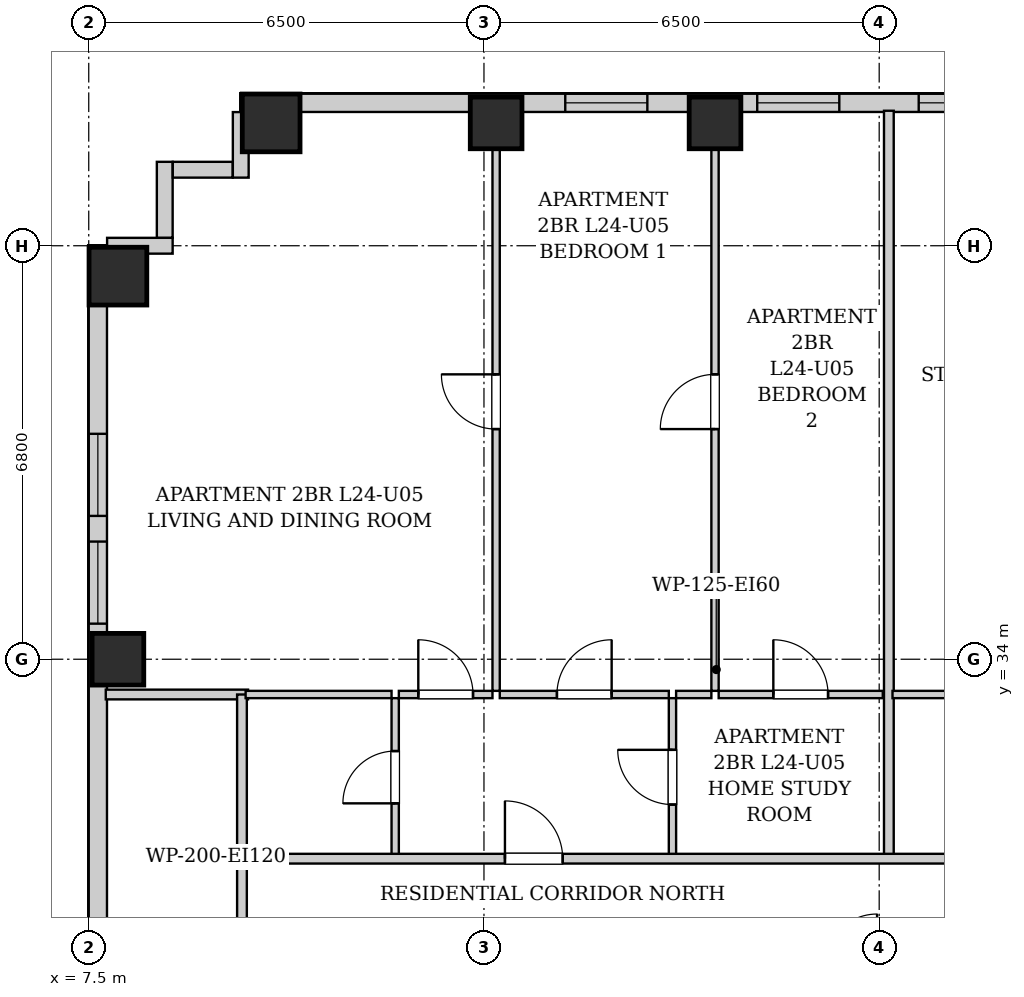
"""IFC4 building model, lengths in metres.
Left out: names, types, materials, properties, quantities, classifications, styles, units other than length and angle.
Written with IfcOpenShell. Run it as: python <this file> out.ifc"""

import sys

from ifc_helpers import new_model, si_unit, direction, frame, frame_2d, origin, origin_2d, place, context, subcontext, project, spatial, rectangle, extrude, element, fill, save


model = new_model("IFC4")
c1 = context("Model", 3, precision=1e-05, world=origin(), true_north=direction((0.0, 1.0)))
c2 = subcontext(c1, "Body", "Model", "MODEL_VIEW")
j1 = project(units=[si_unit("LENGTHUNIT", "METRE"), si_unit("PLANEANGLEUNIT", "RADIAN")], contexts=[c1])
p1 = place(None, origin())
s1 = spatial("IfcSite", under=j1, at=p1, CompositionType="ELEMENT")
p2 = place(p1, origin())
s2 = spatial("IfcBuilding", under=s1, at=p2, CompositionType="ELEMENT")
p3 = place(p2, frame((0.0, 0.0, 87.9)))
s3 = spatial("IfcBuildingStorey", under=s2, at=p3, CompositionType="ELEMENT", Elevation=87.9)
p4 = place(p3, frame((10.5, 42.82, 0.0), z_axis=(0.0, 0.0, 1.0), x_axis=(1.0, 0.0, 0.0)))
e1 = element("IfcColumn", 1, at=p4, inside=s3, PredefinedType="COLUMN", context=c2, shape_type="SweptSolid", body=[
    extrude(rectangle(XDim=0.95, YDim=0.95, at=origin_2d()), origin(), (0.0, 0.0, 1.0), 3.2),
])
for number, where, z_axis, x_axis in (
    (2, (14.2, 42.82, 0.0), (0.0, 0.0, 1.0), (1.0, 0.0, 0.0)),
    (3, (17.8, 42.82, 0.0), (0.0, 0.0, 1.0), (1.0, 0.0, 0.0)),
    (4, (7.98, 34.0, 0.0), (0.0, 0.0, 1.0), (1.0, 0.0, 0.0)),
):
    element("IfcColumn", number, at=place(p3, frame(where, z_axis=z_axis, x_axis=x_axis)), inside=s3, PredefinedType="COLUMN", context=c2, shape_type="SweptSolid", body=[
        extrude(rectangle(XDim=0.85, YDim=0.85, at=origin_2d()), origin(), (0.0, 0.0, 1.0), 3.2),
    ])
p5 = place(p3, frame((7.98, 40.3, 0.0), z_axis=(0.0, 0.0, 1.0), x_axis=(1.0, 0.0, 0.0)))
e5 = element("IfcColumn", 5, at=p5, inside=s3, PredefinedType="COLUMN", context=c2, shape_type="SweptSolid", body=[
    extrude(rectangle(XDim=0.95, YDim=0.95, at=origin_2d()), origin(), (0.0, 0.0, 1.0), 3.2),
])
p6 = place(p3, frame((10.0, 43.15, 0.0), z_axis=(0.0, 0.0, 1.0), x_axis=(1.0, 0.0, 0.0)))
e6 = element("IfcWall", 6, at=p6, inside=s3, PredefinedType="SOLIDWALL", context=c2, shape_type="SweptSolid", body=[
    extrude(rectangle(XDim=23.9, YDim=0.3, at=frame_2d((11.95, 0.0))), origin(), (0.0, 0.0, 1.0), 2.94),
])
p7 = place(p6, frame((5.337, 0.0, 0.55)))
e7 = element("IfcOpeningElement", 7, at=p7, cuts=e6, PredefinedType="OPENING", context=c2, shape_type="SweptSolid", body=[
    extrude(rectangle(XDim=1.35, YDim=1.2, at=frame_2d((0.675, 0.6))), frame((0.0, 0.16, 0.0), z_axis=(0.0, -1.0, 0.0), x_axis=(1.0, 0.0, 0.0)), (0.0, 0.0, 1.0), 0.32),
])
p8 = place(p6, frame((8.494, 0.0, 0.55)))
e8 = element("IfcOpeningElement", 8, at=p8, cuts=e6, PredefinedType="OPENING", context=c2, shape_type="SweptSolid", body=[
    extrude(rectangle(XDim=1.35, YDim=1.2, at=frame_2d((0.675, 0.6))), frame((0.0, 0.16, 0.0), z_axis=(0.0, -1.0, 0.0), x_axis=(1.0, 0.0, 0.0)), (0.0, 0.0, 1.0), 0.32),
])
p9 = place(p6, frame((11.15, 0.0, 0.55)))
e9 = element("IfcOpeningElement", 9, at=p9, cuts=e6, PredefinedType="OPENING", context=c2, shape_type="SweptSolid", body=[
    extrude(rectangle(XDim=1.35, YDim=1.2, at=frame_2d((0.675, 0.6))), frame((0.0, 0.16, 0.0), z_axis=(0.0, -1.0, 0.0), x_axis=(1.0, 0.0, 0.0)), (0.0, 0.0, 1.0), 0.32),
])
p10 = place(p6, frame((17.738, 0.0, 0.55)))
e10 = element("IfcOpeningElement", 10, at=p10, cuts=e6, PredefinedType="OPENING", context=c2, shape_type="SweptSolid", body=[
    extrude(rectangle(XDim=1.35, YDim=1.2, at=frame_2d((0.675, 0.6))), frame((0.0, 0.16, 0.0), z_axis=(0.0, -1.0, 0.0), x_axis=(1.0, 0.0, 0.0)), (0.0, 0.0, 1.0), 0.32),
])
p11 = place(p6, frame((20.97, 0.0, 0.55)))
e11 = element("IfcOpeningElement", 11, at=p11, cuts=e6, PredefinedType="OPENING", context=c2, shape_type="SweptSolid", body=[
    extrude(rectangle(XDim=1.35, YDim=1.2, at=frame_2d((0.675, 0.6))), frame((0.0, 0.16, 0.0), z_axis=(0.0, -1.0, 0.0), x_axis=(1.0, 0.0, 0.0)), (0.0, 0.0, 1.0), 0.32),
])
p12 = place(p3, frame((7.65, 19.4, 0.0), z_axis=(0.0, 0.0, 1.0), x_axis=(0.0, 1.0, 0.0)))
e12 = element("IfcWall", 12, at=p12, inside=s3, PredefinedType="SOLIDWALL", context=c2, shape_type="SweptSolid", body=[
    extrude(rectangle(XDim=21.4, YDim=0.3, at=frame_2d((10.7, 0.0))), origin(), (0.0, 0.0, 1.0), 2.94),
])
p13 = place(p12, frame((16.957, 0.0, 0.55)))
e13 = element("IfcOpeningElement", 13, at=p13, cuts=e12, PredefinedType="OPENING", context=c2, shape_type="SweptSolid", body=[
    extrude(rectangle(XDim=1.35, YDim=1.2, at=frame_2d((0.675, 0.6))), frame((0.0, 0.16, 0.0), z_axis=(0.0, -1.0, 0.0), x_axis=(1.0, 0.0, 0.0)), (0.0, 0.0, 1.0), 0.32),
])
p14 = place(p12, frame((15.185, 0.0, 0.55)))
e14 = element("IfcOpeningElement", 14, at=p14, cuts=e12, PredefinedType="OPENING", context=c2, shape_type="SweptSolid", body=[
    extrude(rectangle(XDim=1.35, YDim=1.2, at=frame_2d((0.675, 0.6))), frame((0.0, 0.16, 0.0), z_axis=(0.0, -1.0, 0.0), x_axis=(1.0, 0.0, 0.0)), (0.0, 0.0, 1.0), 0.32),
])
p15 = place(p12, frame((5.1, 0.0, 0.55)))
e15 = element("IfcOpeningElement", 15, at=p15, cuts=e12, PredefinedType="OPENING", context=c2, shape_type="SweptSolid", body=[
    extrude(rectangle(XDim=1.35, YDim=1.2, at=frame_2d((0.675, 0.6))), frame((0.0, 0.16, 0.0), z_axis=(0.0, -1.0, 0.0), x_axis=(1.0, 0.0, 0.0)), (0.0, 0.0, 1.0), 0.32),
])
p16 = place(p12, frame((6.71, 0.0, 0.55)))
e16 = element("IfcOpeningElement", 16, at=p16, cuts=e12, PredefinedType="OPENING", context=c2, shape_type="SweptSolid", body=[
    extrude(rectangle(XDim=1.35, YDim=1.2, at=frame_2d((0.675, 0.6))), frame((0.0, 0.16, 0.0), z_axis=(0.0, -1.0, 0.0), x_axis=(1.0, 0.0, 0.0)), (0.0, 0.0, 1.0), 0.32),
])
p17 = place(p3, frame((7.802, 40.8, 0.0), z_axis=(0.0, 0.0, 1.0), x_axis=(1.0, 0.0, 0.0)))
e17 = element("IfcWall", 17, at=p17, inside=s3, PredefinedType="SOLIDWALL", context=c2, shape_type="SweptSolid", body=[
    extrude(rectangle(XDim=1.078, YDim=0.26, at=frame_2d((0.539, 0.0))), origin(), (0.0, 0.0, 1.0), 2.94),
])
p18 = place(p3, frame((8.75, 40.932, 0.0), z_axis=(0.0, 0.0, 1.0), x_axis=(0.0, 1.0, 0.0)))
e18 = element("IfcWall", 18, at=p18, inside=s3, PredefinedType="SOLIDWALL", context=c2, shape_type="SweptSolid", body=[
    extrude(rectangle(XDim=1.248, YDim=0.26, at=frame_2d((0.624, 0.0))), origin(), (0.0, 0.0, 1.0), 2.94),
])
p19 = place(p3, frame((8.882, 42.05, 0.0), z_axis=(0.0, 0.0, 1.0), x_axis=(1.0, 0.0, 0.0)))
e19 = element("IfcWall", 19, at=p19, inside=s3, PredefinedType="SOLIDWALL", context=c2, shape_type="SweptSolid", body=[
    extrude(rectangle(XDim=0.986, YDim=0.26, at=frame_2d((0.493, 0.0))), origin(), (0.0, 0.0, 1.0), 2.94),
])
p20 = place(p3, frame((10.0, 41.92, 0.0), z_axis=(0.0, 0.0, 1.0), x_axis=(0.0, 1.0, 0.0)))
e20 = element("IfcWall", 20, at=p20, inside=s3, PredefinedType="SOLIDWALL", context=c2, shape_type="SweptSolid", body=[
    extrude(rectangle(XDim=1.078, YDim=0.26, at=frame_2d((0.539, 0.0))), origin(), (0.0, 0.0, 1.0), 2.94),
])
p21 = place(p3, frame((10.02, 28.98, 0.0), z_axis=(0.0, 0.0, 1.0), x_axis=(0.0, 1.0, 0.0)))
e21 = element("IfcWall", 21, at=p21, inside=s3, PredefinedType="PARTITIONING", context=c2, shape_type="SweptSolid", body=[
    extrude(rectangle(XDim=1.74, YDim=0.16, at=frame_2d((0.87, 0.0))), origin(), (0.0, 0.0, 1.0), 2.94),
])
p22 = place(p3, frame((7.78, 33.42, 0.0), z_axis=(0.0, 0.0, 1.0), x_axis=(1.0, 0.0, 0.0)))
e22 = element("IfcWall", 22, at=p22, inside=s3, PredefinedType="PARTITIONING", context=c2, shape_type="SweptSolid", body=[
    extrude(rectangle(XDim=2.34, YDim=0.16, at=frame_2d((1.17, 0.0))), origin(), (0.0, 0.0, 1.0), 2.94),
])
p23 = place(p3, frame((10.02, 30.76, 0.0), z_axis=(0.0, 0.0, 1.0), x_axis=(0.0, 1.0, 0.0)))
e23 = element("IfcWall", 23, at=p23, inside=s3, PredefinedType="PARTITIONING", context=c2, shape_type="SweptSolid", body=[
    extrude(rectangle(XDim=2.66, YDim=0.16, at=frame_2d((1.33, 0.0))), origin(), (0.0, 0.0, 1.0), 2.94),
])
p24 = place(p3, frame((12.54, 30.76, 0.0), z_axis=(0.0, 0.0, 1.0), x_axis=(0.0, 1.0, 0.0)))
e24 = element("IfcWall", 24, at=p24, inside=s3, PredefinedType="PARTITIONING", context=c2, shape_type="SweptSolid", body=[
    extrude(rectangle(XDim=2.6, YDim=0.12, at=frame_2d((1.3, 0.0))), origin(), (0.0, 0.0, 1.0), 2.94),
])
p25 = place(p24, frame((0.87, 0.0, 0.0)))
e25 = element("IfcOpeningElement", 25, at=p25, cuts=e24, PredefinedType="OPENING", context=c2, shape_type="SweptSolid", body=[
    extrude(rectangle(XDim=0.86, YDim=2.05, at=frame_2d((0.43, 1.025))), frame((0.0, 0.07, 0.0), z_axis=(0.0, -1.0, 0.0), x_axis=(1.0, 0.0, 0.0)), (0.0, 0.0, 1.0), 0.14),
])
p26 = place(p3, frame((10.08, 33.42, 0.0), z_axis=(0.0, 0.0, 1.0), x_axis=(1.0, 0.0, 0.0)))
e26 = element("IfcWall", 26, at=p26, inside=s3, PredefinedType="PARTITIONING", context=c2, shape_type="SweptSolid", body=[
    extrude(rectangle(XDim=2.4, YDim=0.12, at=frame_2d((1.2, 0.0))), origin(), (0.0, 0.0, 1.0), 2.94),
])
p27 = place(p3, frame((17.1, 30.76, 0.0), z_axis=(0.0, 0.0, 1.0), x_axis=(0.0, 1.0, 0.0)))
e27 = element("IfcWall", 27, at=p27, inside=s3, PredefinedType="PARTITIONING", context=c2, shape_type="SweptSolid", body=[
    extrude(rectangle(XDim=2.6, YDim=0.12, at=frame_2d((1.3, 0.0))), origin(), (0.0, 0.0, 1.0), 2.94),
])
p28 = place(p27, frame((0.85, 0.0, 0.0)))
e28 = element("IfcOpeningElement", 28, at=p28, cuts=e27, PredefinedType="OPENING", context=c2, shape_type="SweptSolid", body=[
    extrude(rectangle(XDim=0.9, YDim=2.05, at=frame_2d((0.45, 1.025))), frame((0.0, 0.07, 0.0), z_axis=(0.0, -1.0, 0.0), x_axis=(1.0, 0.0, 0.0)), (0.0, 0.0, 1.0), 0.14),
])
p29 = place(p3, frame((12.6, 33.42, 0.0), z_axis=(0.0, 0.0, 1.0), x_axis=(1.0, 0.0, 0.0)))
e29 = element("IfcWall", 29, at=p29, inside=s3, PredefinedType="PARTITIONING", context=c2, shape_type="SweptSolid", body=[
    extrude(rectangle(XDim=1.54, YDim=0.12, at=frame_2d((0.77, 0.0))), origin(), (0.0, 0.0, 1.0), 2.94),
])
p30 = place(p29, frame((0.32, 0.0, 0.0)))
e30 = element("IfcOpeningElement", 30, at=p30, cuts=e29, PredefinedType="OPENING", context=c2, shape_type="SweptSolid", body=[
    extrude(rectangle(XDim=0.9, YDim=2.05, at=frame_2d((0.45, 1.025))), frame((0.0, 0.07, 0.0), z_axis=(0.0, -1.0, 0.0), x_axis=(1.0, 0.0, 0.0)), (0.0, 0.0, 1.0), 0.14),
])
p31 = place(p3, frame((14.26, 33.42, 0.0), z_axis=(0.0, 0.0, 1.0), x_axis=(1.0, 0.0, 0.0)))
e31 = element("IfcWall", 31, at=p31, inside=s3, PredefinedType="PARTITIONING", context=c2, shape_type="SweptSolid", body=[
    extrude(rectangle(XDim=2.78, YDim=0.12, at=frame_2d((1.39, 0.0))), origin(), (0.0, 0.0, 1.0), 2.94),
])
p32 = place(p31, frame((0.94, 0.0, 0.0)))
e32 = element("IfcOpeningElement", 32, at=p32, cuts=e31, PredefinedType="OPENING", context=c2, shape_type="SweptSolid", body=[
    extrude(rectangle(XDim=0.9, YDim=2.05, at=frame_2d((0.45, 1.025))), frame((0.0, 0.07, 0.0), z_axis=(0.0, -1.0, 0.0), x_axis=(1.0, 0.0, 0.0)), (0.0, 0.0, 1.0), 0.14),
])
p33 = place(p3, frame((17.16, 33.42, 0.0), z_axis=(0.0, 0.0, 1.0), x_axis=(1.0, 0.0, 0.0)))
e33 = element("IfcWall", 33, at=p33, inside=s3, PredefinedType="PARTITIONING", context=c2, shape_type="SweptSolid", body=[
    extrude(rectangle(XDim=0.58, YDim=0.12, at=frame_2d((0.29, 0.0))), origin(), (0.0, 0.0, 1.0), 2.94),
])
p34 = place(p3, frame((17.86, 33.42, 0.0), z_axis=(0.0, 0.0, 1.0), x_axis=(1.0, 0.0, 0.0)))
e34 = element("IfcWall", 34, at=p34, inside=s3, PredefinedType="PARTITIONING", context=c2, shape_type="SweptSolid", body=[
    extrude(rectangle(XDim=2.699, YDim=0.12, at=frame_2d((1.35, 0.0))), origin(), (0.0, 0.0, 1.0), 2.94),
])
p35 = place(p34, frame((0.899, 0.0, 0.0)))
e35 = element("IfcOpeningElement", 35, at=p35, cuts=e34, PredefinedType="OPENING", context=c2, shape_type="SweptSolid", body=[
    extrude(rectangle(XDim=0.9, YDim=2.05, at=frame_2d((0.45, 1.025))), frame((0.0, 0.07, 0.0), z_axis=(0.0, -1.0, 0.0), x_axis=(1.0, 0.0, 0.0)), (0.0, 0.0, 1.0), 0.14),
])
p36 = place(p3, frame((14.2, 33.48, 0.0), z_axis=(0.0, 0.0, 1.0), x_axis=(0.0, 1.0, 0.0)))
e36 = element("IfcWall", 36, at=p36, inside=s3, PredefinedType="PARTITIONING", context=c2, shape_type="SweptSolid", body=[
    extrude(rectangle(XDim=9.54, YDim=0.12, at=frame_2d((4.77, 0.0))), origin(), (0.0, 0.0, 1.0), 2.94),
])
p37 = place(p36, frame((4.305, 0.0, 0.0)))
e37 = element("IfcOpeningElement", 37, at=p37, cuts=e36, PredefinedType="OPENING", context=c2, shape_type="SweptSolid", body=[
    extrude(rectangle(XDim=0.9, YDim=2.05, at=frame_2d((0.45, 1.025))), frame((0.0, 0.07, 0.0), z_axis=(0.0, -1.0, 0.0), x_axis=(1.0, 0.0, 0.0)), (0.0, 0.0, 1.0), 0.14),
])
p38 = place(p3, frame((17.8, 33.48, 0.0), z_axis=(0.0, 0.0, 1.0), x_axis=(0.0, 1.0, 0.0)))
e38 = element("IfcWall", 38, at=p38, inside=s3, PredefinedType="PARTITIONING", context=c2, shape_type="SweptSolid", body=[
    extrude(rectangle(XDim=9.54, YDim=0.12, at=frame_2d((4.77, 0.0))), origin(), (0.0, 0.0, 1.0), 2.309),
])
p39 = place(p38, frame((4.305, 0.0, 0.0)))
e39 = element("IfcOpeningElement", 39, at=p39, cuts=e38, PredefinedType="OPENING", context=c2, shape_type="SweptSolid", body=[
    extrude(rectangle(XDim=0.9, YDim=2.05, at=frame_2d((0.45, 1.025))), frame((0.0, 0.07, 0.0), z_axis=(0.0, -1.0, 0.0), x_axis=(1.0, 0.0, 0.0)), (0.0, 0.0, 1.0), 0.14),
])
p40 = place(p3, frame((20.659, 30.76, 0.0), z_axis=(0.0, 0.0, 1.0), x_axis=(0.0, 1.0, 0.0)))
e40 = element("IfcWall", 40, at=p40, inside=s3, PredefinedType="PARTITIONING", context=c2, shape_type="SweptSolid", body=[
    extrude(rectangle(XDim=12.26, YDim=0.16, at=frame_2d((6.13, 0.0))), origin(), (0.0, 0.0, 1.0), 2.94),
])
p41 = place(p3, frame((20.719, 33.42, 0.0), z_axis=(0.0, 0.0, 1.0), x_axis=(1.0, 0.0, 0.0)))
e41 = element("IfcWall", 41, at=p41, inside=s3, PredefinedType="PARTITIONING", context=c2, shape_type="SweptSolid", body=[
    extrude(rectangle(XDim=1.85, YDim=0.12, at=frame_2d((0.925, 0.0))), origin(), (0.0, 0.0, 1.0), 2.94),
])
p42 = place(p3, frame((10.05, 30.72, 0.0), z_axis=(0.0, 0.0, 1.0), x_axis=(1.0, 0.0, 0.0)))
e42 = element("IfcWall", 42, at=p42, inside=s3, PredefinedType="PARTITIONING", context=c2, shape_type="SweptSolid", body=[
    extrude(rectangle(XDim=30.8, YDim=0.16, at=frame_2d((15.4, 0.0))), origin(), (0.0, 0.0, 1.0), 2.94),
])
p43 = place(p42, frame((4.295, 0.0, 0.0)))
e43 = element("IfcOpeningElement", 43, at=p43, cuts=e42, PredefinedType="OPENING", context=c2, shape_type="SweptSolid", body=[
    extrude(rectangle(XDim=0.95, YDim=2.1, at=frame_2d((0.475, 1.05))), frame((0.0, 0.09, 0.0), z_axis=(0.0, -1.0, 0.0), x_axis=(1.0, 0.0, 0.0)), (0.0, 0.0, 1.0), 0.18),
])
p44 = place(p42, frame((14.179, 0.0, 0.0)))
e44 = element("IfcOpeningElement", 44, at=p44, cuts=e42, PredefinedType="OPENING", context=c2, shape_type="SweptSolid", body=[
    extrude(rectangle(XDim=0.95, YDim=2.1, at=frame_2d((0.475, 1.05))), frame((0.0, 0.09, 0.0), z_axis=(0.0, -1.0, 0.0), x_axis=(1.0, 0.0, 0.0)), (0.0, 0.0, 1.0), 0.18),
])
p45 = place(p42, frame((20.965, 0.0, 0.0)))
e45 = element("IfcOpeningElement", 45, at=p45, cuts=e42, PredefinedType="OPENING", context=c2, shape_type="SweptSolid", body=[
    extrude(rectangle(XDim=0.95, YDim=2.1, at=frame_2d((0.475, 1.05))), frame((0.0, 0.09, 0.0), z_axis=(0.0, -1.0, 0.0), x_axis=(1.0, 0.0, 0.0)), (0.0, 0.0, 1.0), 0.18),
])
p46 = place(p25, origin())
e46 = element("IfcDoor", 46, at=p46, inside=s3, OperationType="SINGLE_SWING_LEFT", PredefinedType="DOOR", context=c2, shape_type="SweptSolid", body=[
    extrude(rectangle(XDim=0.86, YDim=2.05, at=frame_2d((0.43, 1.025))), frame((0.0, 0.025, 0.0), z_axis=(0.0, -1.0, 0.0), x_axis=(1.0, 0.0, 0.0)), (0.0, 0.0, 1.0), 0.05),
])
fill(e25, e46)
p47 = place(p28, origin())
e47 = element("IfcDoor", 47, at=p47, inside=s3, OperationType="SINGLE_SWING_RIGHT", PredefinedType="DOOR", context=c2, shape_type="SweptSolid", body=[
    extrude(rectangle(XDim=0.9, YDim=2.05, at=frame_2d((0.45, 1.025))), frame((0.0, 0.025, 0.0), z_axis=(0.0, -1.0, 0.0), x_axis=(1.0, 0.0, 0.0)), (0.0, 0.0, 1.0), 0.05),
])
fill(e28, e47)
p48 = place(p30, origin())
e48 = element("IfcDoor", 48, at=p48, inside=s3, OperationType="SINGLE_SWING_LEFT", PredefinedType="DOOR", context=c2, shape_type="SweptSolid", body=[
    extrude(rectangle(XDim=0.9, YDim=2.05, at=frame_2d((0.45, 1.025))), frame((0.0, 0.025, 0.0), z_axis=(0.0, -1.0, 0.0), x_axis=(1.0, 0.0, 0.0)), (0.0, 0.0, 1.0), 0.05),
])
fill(e30, e48)
p49 = place(p32, origin())
e49 = element("IfcDoor", 49, at=p49, inside=s3, OperationType="SINGLE_SWING_RIGHT", PredefinedType="DOOR", context=c2, shape_type="SweptSolid", body=[
    extrude(rectangle(XDim=0.9, YDim=2.05, at=frame_2d((0.45, 1.025))), frame((0.0, 0.025, 0.0), z_axis=(0.0, -1.0, 0.0), x_axis=(1.0, 0.0, 0.0)), (0.0, 0.0, 1.0), 0.05),
])
fill(e32, e49)
p50 = place(p35, origin())
e50 = element("IfcDoor", 50, at=p50, inside=s3, OperationType="SINGLE_SWING_LEFT", PredefinedType="DOOR", context=c2, shape_type="SweptSolid", body=[
    extrude(rectangle(XDim=0.9, YDim=2.05, at=frame_2d((0.45, 1.025))), frame((0.0, 0.025, 0.0), z_axis=(0.0, -1.0, 0.0), x_axis=(1.0, 0.0, 0.0)), (0.0, 0.0, 1.0), 0.05),
])
fill(e35, e50)
p51 = place(p37, origin())
e51 = element("IfcDoor", 51, at=p51, inside=s3, OperationType="SINGLE_SWING_RIGHT", PredefinedType="DOOR", context=c2, shape_type="SweptSolid", body=[
    extrude(rectangle(XDim=0.9, YDim=2.05, at=frame_2d((0.45, 1.025))), frame((0.0, 0.025, 0.0), z_axis=(0.0, -1.0, 0.0), x_axis=(1.0, 0.0, 0.0)), (0.0, 0.0, 1.0), 0.05),
])
fill(e37, e51)
p52 = place(p39, origin())
e52 = element("IfcDoor", 52, at=p52, inside=s3, OperationType="SINGLE_SWING_LEFT", PredefinedType="DOOR", context=c2, shape_type="SweptSolid", body=[
    extrude(rectangle(XDim=0.9, YDim=2.05, at=frame_2d((0.45, 1.025))), frame((0.0, 0.025, 0.0), z_axis=(0.0, -1.0, 0.0), x_axis=(1.0, 0.0, 0.0)), (0.0, 0.0, 1.0), 0.05),
])
fill(e39, e52)
p53 = place(p43, origin())
e53 = element("IfcDoor", 53, at=p53, inside=s3, OperationType="SINGLE_SWING_LEFT", PredefinedType="DOOR", context=c2, shape_type="SweptSolid", body=[
    extrude(rectangle(XDim=0.95, YDim=2.1, at=frame_2d((0.475, 1.05))), frame((0.0, 0.025, 0.0), z_axis=(0.0, -1.0, 0.0), x_axis=(1.0, 0.0, 0.0)), (0.0, 0.0, 1.0), 0.05),
])
fill(e43, e53)
p54 = place(p13, origin())
e54 = element("IfcWindow", 54, at=p54, inside=s3, PartitioningType="SINGLE_PANEL", PredefinedType="WINDOW", context=c2, shape_type="SweptSolid", body=[
    extrude(rectangle(XDim=1.35, YDim=1.2, at=frame_2d((0.675, 0.6))), frame((0.0, 0.03, 0.0), z_axis=(0.0, -1.0, 0.0), x_axis=(1.0, 0.0, 0.0)), (0.0, 0.0, 1.0), 0.06),
])
fill(e13, e54)
p55 = place(p14, origin())
e55 = element("IfcWindow", 55, at=p55, inside=s3, PartitioningType="SINGLE_PANEL", PredefinedType="WINDOW", context=c2, shape_type="SweptSolid", body=[
    extrude(rectangle(XDim=1.35, YDim=1.2, at=frame_2d((0.675, 0.6))), frame((0.0, 0.03, 0.0), z_axis=(0.0, -1.0, 0.0), x_axis=(1.0, 0.0, 0.0)), (0.0, 0.0, 1.0), 0.06),
])
fill(e14, e55)
p56 = place(p7, origin())
e56 = element("IfcWindow", 56, at=p56, inside=s3, PartitioningType="SINGLE_PANEL", PredefinedType="WINDOW", context=c2, shape_type="SweptSolid", body=[
    extrude(rectangle(XDim=1.35, YDim=1.2, at=frame_2d((0.675, 0.6))), frame((0.0, 0.03, 0.0), z_axis=(0.0, -1.0, 0.0), x_axis=(1.0, 0.0, 0.0)), (0.0, 0.0, 1.0), 0.06),
])
fill(e7, e56)
p57 = place(p8, origin())
e57 = element("IfcWindow", 57, at=p57, inside=s3, PartitioningType="SINGLE_PANEL", PredefinedType="WINDOW", context=c2, shape_type="SweptSolid", body=[
    extrude(rectangle(XDim=1.35, YDim=1.2, at=frame_2d((0.675, 0.6))), frame((0.0, 0.03, 0.0), z_axis=(0.0, -1.0, 0.0), x_axis=(1.0, 0.0, 0.0)), (0.0, 0.0, 1.0), 0.06),
])
fill(e8, e57)
p58 = place(p9, origin())
e58 = element("IfcWindow", 58, at=p58, inside=s3, PartitioningType="SINGLE_PANEL", PredefinedType="WINDOW", context=c2, shape_type="SweptSolid", body=[
    extrude(rectangle(XDim=1.35, YDim=1.2, at=frame_2d((0.675, 0.6))), frame((0.0, 0.03, 0.0), z_axis=(0.0, -1.0, 0.0), x_axis=(1.0, 0.0, 0.0)), (0.0, 0.0, 1.0), 0.06),
])
fill(e9, e58)
save(model, sys.argv[1])
